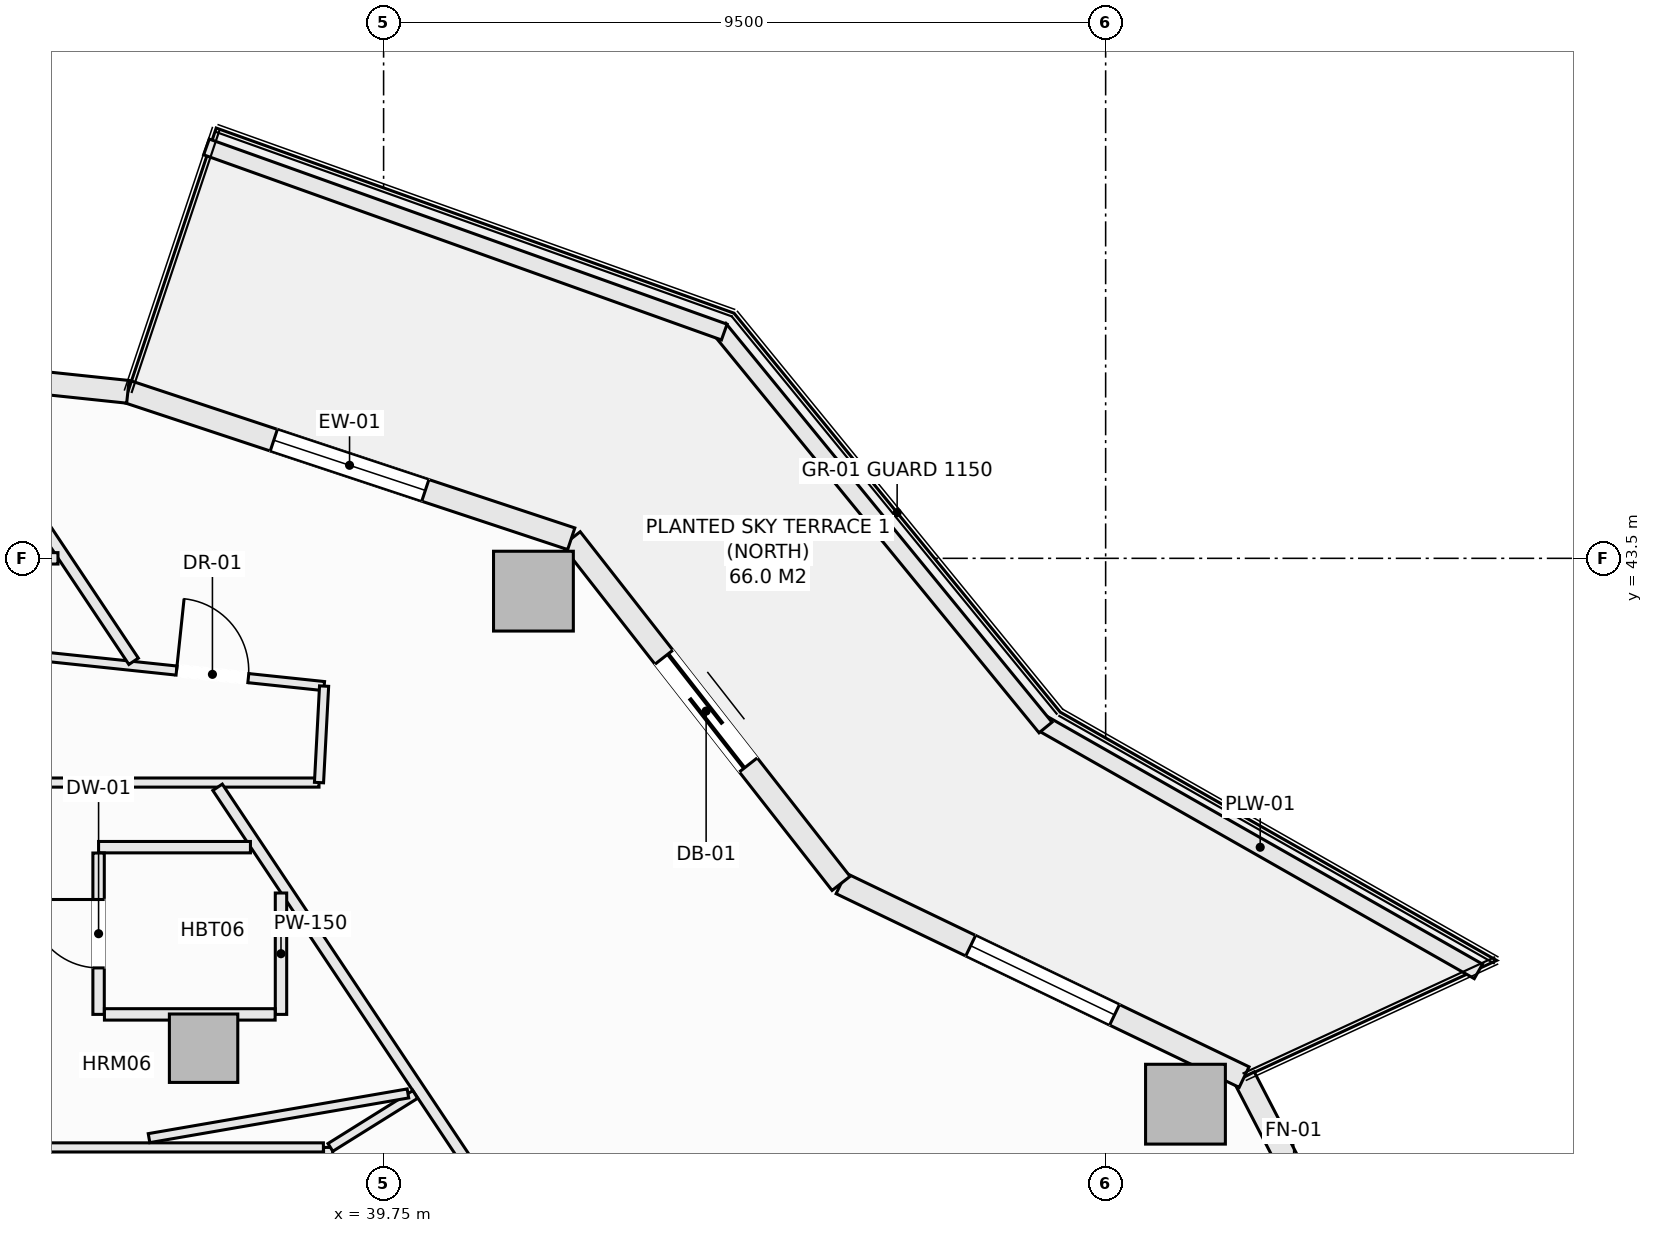
"""IFC4 building model, lengths in metres.
Left out: names, types, materials, properties, quantities, classifications, styles, units other than length and angle.
Written with IfcOpenShell. Run it as: python <this file> out.ifc"""

import sys

from ifc_helpers import new_model, si_unit, direction, frame, frame_2d, origin, origin_2d, place, context, subcontext, project, spatial, rectangle, extrude, element, fill, save


model = new_model("IFC4")
c1 = context("Model", 3, precision=1e-05, world=origin(), true_north=direction((0.0, 1.0)))
c2 = subcontext(c1, "Body", "Model", "MODEL_VIEW")
j1 = project(units=[si_unit("LENGTHUNIT", "METRE"), si_unit("PLANEANGLEUNIT", "RADIAN")], contexts=[c1])
p1 = place(None, origin())
s1 = spatial("IfcSite", under=j1, at=p1, CompositionType="ELEMENT")
p2 = place(p1, origin())
s2 = spatial("IfcBuilding", under=s1, at=p2, CompositionType="ELEMENT")
p3 = place(p2, frame((0.0, 0.0, 108.7)))
s3 = spatial("IfcBuildingStorey", under=s2, at=p3, CompositionType="ELEMENT", Elevation=108.7)
for number, where, z_axis, x_axis in (
    (1, (50.3, 36.319, -0.27), (0.0, 0.0, 1.0), (1.0, 0.0, 0.0)),
    (2, (41.721, 43.068, -0.27), (0.0, 0.0, 1.0), (1.0, 0.0, 0.0)),
):
    element("IfcColumn", number, at=place(p3, frame(where, z_axis=z_axis, x_axis=x_axis)), inside=s3, PredefinedType="COLUMN", context=c2, shape_type="SweptSolid", body=[
        extrude(rectangle(XDim=1.05, YDim=1.05, at=origin_2d()), origin(), (0.0, 0.0, 1.0), 3.4),
    ])
p4 = place(p3, frame((37.382, 37.055, -0.27), z_axis=(0.0, 0.0, 1.0), x_axis=(1.0, 0.0, 0.0)))
e3 = element("IfcColumn", 3, at=p4, inside=s3, PredefinedType="COLUMN", context=c2, shape_type="SweptSolid", body=[
    extrude(rectangle(XDim=0.9, YDim=0.9, at=origin_2d()), origin(), (0.0, 0.0, 1.0), 3.4),
])
p5 = place(p3, frame((51.072, 36.675, 0.0), z_axis=(0.0, 0.0, 1.0), x_axis=(0.459767899643, -0.888039119892, 0.0)))
e4 = element("IfcWall", 4, at=p5, inside=s3, PredefinedType="SOLIDWALL", context=c2, shape_type="SweptSolid", body=[
    extrude(rectangle(XDim=5.255, YDim=0.3, at=frame_2d((2.628, 0.0))), origin(), (0.0, 0.0, 1.0), 2.653),
])
p6 = place(p5, frame((1.578, 0.0, 0.74)))
e5 = element("IfcOpeningElement", 5, at=p6, cuts=e4, PredefinedType="OPENING", context=c2, shape_type="SweptSolid", body=[
    extrude(rectangle(XDim=2.1, YDim=1.7, at=frame_2d((1.05, 0.85))), frame((0.0, 0.16, 0.0), z_axis=(0.0, -1.0, 0.0), x_axis=(1.0, 0.0, 0.0)), (0.0, 0.0, 1.0), 0.32),
])
p7 = place(p3, frame((45.769, 39.223, 0.0), z_axis=(0.0, 0.0, 1.0), x_axis=(0.901370184739, -0.433049408339, 0.0)))
e6 = element("IfcWall", 6, at=p7, inside=s3, PredefinedType="SOLIDWALL", context=c2, shape_type="SweptSolid", body=[
    extrude(rectangle(XDim=5.884, YDim=0.3, at=frame_2d((2.942, 0.0))), origin(), (0.0, 0.0, 1.0), 2.653),
])
p8 = place(p7, frame((1.892, 0.0, 0.74)))
e7 = element("IfcOpeningElement", 7, at=p8, cuts=e6, PredefinedType="OPENING", context=c2, shape_type="SweptSolid", body=[
    extrude(rectangle(XDim=2.1, YDim=1.7, at=frame_2d((1.05, 0.85))), frame((0.0, 0.16, 0.0), z_axis=(0.0, -1.0, 0.0), x_axis=(1.0, 0.0, 0.0)), (0.0, 0.0, 1.0), 0.32),
])
p9 = place(p3, frame((42.219, 43.758, 0.0), z_axis=(0.0, 0.0, 1.0), x_axis=(0.616435134162, -0.787405693001, 0.0)))
e8 = element("IfcWall", 8, at=p9, inside=s3, PredefinedType="SOLIDWALL", context=c2, shape_type="SweptSolid", body=[
    extrude(rectangle(XDim=5.759, YDim=0.3, at=frame_2d((2.879, 0.0))), origin(), (0.0, 0.0, 1.0), 2.653),
])
p10 = place(p9, frame((1.979, 0.0, 0.0)))
e9 = element("IfcOpeningElement", 9, at=p10, cuts=e8, PredefinedType="OPENING", context=c2, shape_type="SweptSolid", body=[
    extrude(rectangle(XDim=1.8, YDim=2.25, at=frame_2d((0.9, 1.125))), frame((0.0, 0.16, 0.0), z_axis=(0.0, -1.0, 0.0), x_axis=(1.0, 0.0, 0.0)), (0.0, 0.0, 1.0), 0.32),
])
p11 = place(p3, frame((36.385, 45.691, 0.0), z_axis=(0.0, 0.0, 1.0), x_axis=(0.949238009374, -0.314558741032, 0.0)))
e10 = element("IfcWall", 10, at=p11, inside=s3, PredefinedType="SOLIDWALL", context=c2, shape_type="SweptSolid", body=[
    extrude(rectangle(XDim=6.146, YDim=0.3, at=frame_2d((3.073, 0.0))), origin(), (0.0, 0.0, 1.0), 2.653),
])
p12 = place(p11, frame((2.023, 0.0, 0.74)))
e11 = element("IfcOpeningElement", 11, at=p12, cuts=e10, PredefinedType="OPENING", context=c2, shape_type="SweptSolid", body=[
    extrude(rectangle(XDim=2.1, YDim=1.7, at=frame_2d((1.05, 0.85))), frame((0.0, 0.16, 0.0), z_axis=(0.0, -1.0, 0.0), x_axis=(1.0, 0.0, 0.0)), (0.0, 0.0, 1.0), 0.32),
])
p13 = place(p3, frame((30.125, 46.35, 0.0), z_axis=(0.0, 0.0, 1.0), x_axis=(0.994498012394, -0.104755445421, 0.0)))
e12 = element("IfcWall", 12, at=p13, inside=s3, PredefinedType="SOLIDWALL", context=c2, shape_type="SweptSolid", body=[
    extrude(rectangle(XDim=6.295, YDim=0.3, at=frame_2d((3.147, 0.0))), origin(), (0.0, 0.0, 1.0), 2.653),
])
p14 = place(p13, frame((1.18, 0.0, 0.72)))
e13 = element("IfcOpeningElement", 13, at=p14, cuts=e12, PredefinedType="OPENING", context=c2, shape_type="SweptSolid", body=[
    extrude(rectangle(XDim=1.2, YDim=1.65, at=frame_2d((0.6, 0.825))), frame((0.0, 0.16, 0.0), z_axis=(0.0, -1.0, 0.0), x_axis=(1.0, 0.0, 0.0)), (0.0, 0.0, 1.0), 0.32),
])
p15 = place(p3, frame((48.413, 41.332, 0.0), z_axis=(0.0, 0.0, 1.0), x_axis=(0.869187658335, -0.494482370361, 0.0)))
e14 = element("IfcWall", 14, at=p15, inside=s3, PredefinedType="PARAPET", context=c2, shape_type="SweptSolid", body=[
    extrude(rectangle(XDim=6.606, YDim=0.22, at=frame_2d((3.303, 0.0))), origin(), (0.0, 0.0, 1.0), 0.52),
])
p16 = place(p3, frame((44.167, 46.523, 0.0), z_axis=(0.0, 0.0, 1.0), x_axis=(0.633002467947, -0.77414977593, 0.0)))
e15 = element("IfcWall", 15, at=p16, inside=s3, PredefinedType="PARAPET", context=c2, shape_type="SweptSolid", body=[
    extrude(rectangle(XDim=6.78, YDim=0.22, at=frame_2d((3.39, 0.0))), origin(), (0.0, 0.0, 1.0), 0.52),
])
p17 = place(p3, frame((37.419, 48.913, 0.0), z_axis=(0.0, 0.0, 1.0), x_axis=(0.941632697311, -0.336642040387, 0.0)))
e16 = element("IfcWall", 16, at=p17, inside=s3, PredefinedType="PARAPET", context=c2, shape_type="SweptSolid", body=[
    extrude(rectangle(XDim=7.236, YDim=0.22, at=frame_2d((3.618, 0.0))), origin(), (0.0, 0.0, 1.0), 0.52),
])
p18 = place(p3, frame((39.02, 33.75, 0.0), z_axis=(0.0, 0.0, 1.0), x_axis=(0.0, 1.0, 0.0)))
e17 = element("IfcWall", 17, at=p18, inside=s3, PredefinedType="PARTITIONING", context=c2, shape_type="SweptSolid", body=[
    extrude(rectangle(XDim=2.0, YDim=0.12, at=frame_2d((1.0, 0.0))), origin(), (0.0, 0.0, 1.0), 3.13),
])
p19 = place(p3, frame((34.08, 35.75, 0.0), z_axis=(0.0, 0.0, 1.0), x_axis=(1.0, 0.0, 0.0)))
e18 = element("IfcWall", 18, at=p19, inside=s3, PredefinedType="PARTITIONING", context=c2, shape_type="SweptSolid", body=[
    extrude(rectangle(XDim=4.878, YDim=0.12, at=frame_2d((2.439, 0.0))), origin(), (0.0, 0.0, 1.0), 2.505),
])
p20 = place(p3, frame((34.08, 40.55, 0.0), z_axis=(0.0, 0.0, 1.0), x_axis=(1.0, 0.0, 0.0)))
e19 = element("IfcWall", 19, at=p20, inside=s3, PredefinedType="PARTITIONING", context=c2, shape_type="SweptSolid", body=[
    extrude(rectangle(XDim=4.82, YDim=0.12, at=frame_2d((2.41, 0.0))), origin(), (0.0, 0.0, 1.0), 3.13),
])
p21 = place(p3, frame((32.501, 42.5, 0.0), z_axis=(0.0, 0.0, 1.0), x_axis=(0.994501131299, -0.104725831799, 0.0)))
e20 = element("IfcWall", 20, at=p21, inside=s3, PredefinedType="PARTITIONING", context=c2, shape_type="SweptSolid", body=[
    extrude(rectangle(XDim=6.502, YDim=0.12, at=frame_2d((3.251, 0.0))), origin(), (0.0, 0.0, 1.0), 3.13),
])
p22 = place(p21, frame((4.55, 0.0, 0.0)))
e21 = element("IfcOpeningElement", 21, at=p22, cuts=e20, PredefinedType="OPENING", context=c2, shape_type="SweptSolid", body=[
    extrude(rectangle(XDim=0.95, YDim=2.1, at=frame_2d((0.475, 1.05))), frame((0.0, 0.07, 0.0), z_axis=(0.0, -1.0, 0.0), x_axis=(1.0, 0.0, 0.0)), (0.0, 0.0, 1.0), 0.14),
])
p23 = place(p3, frame((38.9, 40.55, 0.0), z_axis=(0.0, 0.0, 1.0), x_axis=(0.052831079727, 0.99860346335, 0.0)))
e22 = element("IfcWall", 22, at=p23, inside=s3, PredefinedType="PARTITIONING", context=c2, shape_type="SweptSolid", body=[
    extrude(rectangle(XDim=1.271, YDim=0.12, at=frame_2d((0.635, 0.0))), origin(), (0.0, 0.0, 1.0), 3.13),
])
p24 = place(p3, frame((34.035, 45.785, 0.0), z_axis=(0.0, 0.0, 1.0), x_axis=(0.554584277701, -0.832127561691, 0.0)))
e23 = element("IfcWall", 23, at=p24, inside=s3, PredefinedType="PARTITIONING", context=c2, shape_type="SweptSolid", body=[
    extrude(rectangle(XDim=4.375, YDim=0.15, at=frame_2d((2.187, 0.0))), origin(), (0.0, 0.0, 1.0), 3.13),
])
p25 = place(p3, frame((37.565, 40.488, 0.0), z_axis=(0.0, 0.0, 1.0), x_axis=(0.554585457046, -0.832126775698, 0.0)))
e24 = element("IfcWall", 24, at=p25, inside=s3, PredefinedType="PARTITIONING", context=c2, shape_type="SweptSolid", body=[
    extrude(rectangle(XDim=19.151, YDim=0.15, at=frame_2d((9.575, 0.0))), origin(), (0.0, 0.0, 1.0), 3.13),
])
p26 = place(p3, frame((38.4, 37.5, 0.0), z_axis=(0.0, 0.0, 1.0), x_axis=(0.0, 1.0, 0.0)))
e25 = element("IfcWall", 25, at=p26, inside=s3, PredefinedType="PARTITIONING", context=c2, shape_type="SweptSolid", body=[
    extrude(rectangle(XDim=1.597, YDim=0.15, at=frame_2d((0.798, 0.0))), origin(), (0.0, 0.0, 1.0), 2.505),
])
p27 = place(p3, frame((39.05, 35.75, 0.0), z_axis=(0.0, 0.0, 1.0), x_axis=(0.848206690128, 0.529665376272, 0.0)))
e26 = element("IfcWall", 26, at=p27, inside=s3, PredefinedType="PARTITIONING", context=c2, shape_type="SweptSolid", body=[
    extrude(rectangle(XDim=1.316, YDim=0.12, at=frame_2d((0.658, 0.0))), origin(), (0.0, 0.0, 1.0), 3.13),
])
p28 = place(p3, frame((36.0, 39.7, 0.0), z_axis=(0.0, 0.0, 1.0), x_axis=(1.0, 0.0, 0.0)))
e27 = element("IfcWall", 27, at=p28, inside=s3, PredefinedType="PARTITIONING", context=c2, shape_type="SweptSolid", body=[
    extrude(rectangle(XDim=1.998, YDim=0.15, at=frame_2d((0.999, 0.0))), origin(), (0.0, 0.0, 1.0), 3.13),
])
p29 = place(p3, frame((36.0, 37.5, 0.0), z_axis=(0.0, 0.0, 1.0), x_axis=(0.0, 1.0, 0.0)))
e28 = element("IfcWall", 28, at=p29, inside=s3, PredefinedType="PARTITIONING", context=c2, shape_type="SweptSolid", body=[
    extrude(rectangle(XDim=2.123, YDim=0.15, at=frame_2d((1.062, 0.0))), origin(), (0.0, 0.0, 1.0), 3.13),
])
p30 = place(p29, frame((0.612, 0.0, 0.0)))
e29 = element("IfcOpeningElement", 29, at=p30, cuts=e28, PredefinedType="OPENING", context=c2, shape_type="SweptSolid", body=[
    extrude(rectangle(XDim=0.9, YDim=2.1, at=frame_2d((0.45, 1.05))), frame((0.0, 0.085, 0.0), z_axis=(0.0, -1.0, 0.0), x_axis=(1.0, 0.0, 0.0)), (0.0, 0.0, 1.0), 0.17),
])
p31 = place(p3, frame((36.077, 37.5, 0.0), z_axis=(0.0, 0.0, 1.0), x_axis=(1.0, 0.0, 0.0)))
e30 = element("IfcWall", 30, at=p31, inside=s3, PredefinedType="PARTITIONING", context=c2, shape_type="SweptSolid", body=[
    extrude(rectangle(XDim=2.246, YDim=0.15, at=frame_2d((1.123, 0.0))), origin(), (0.0, 0.0, 1.0), 2.505),
])
p32 = place(p3, frame((36.664, 35.872, 0.0), z_axis=(0.0, 0.0, 1.0), x_axis=(0.985420944478, 0.170133953648, 0.0)))
e31 = element("IfcWall", 31, at=p32, inside=s3, PredefinedType="PARTITIONING", context=c2, shape_type="SweptSolid", body=[
    extrude(rectangle(XDim=3.457, YDim=0.12, at=frame_2d((1.729, 0.0))), origin(), (0.0, 0.0, 1.0), 3.13),
])
p33 = place(p3, frame((33.077, 43.5, 0.0), z_axis=(0.0, 0.0, 1.0), x_axis=(1.0, 0.0, 0.0)))
e32 = element("IfcWall", 32, at=p33, inside=s3, PredefinedType="PARTITIONING", context=c2, shape_type="SweptSolid", body=[
    extrude(rectangle(XDim=2.389, YDim=0.15, at=frame_2d((1.194, 0.0))), origin(), (0.0, 0.0, 1.0), 3.13),
])
p34 = place(p8, origin())
e33 = element("IfcWindow", 33, at=p34, inside=s3, PartitioningType="SINGLE_PANEL", PredefinedType="WINDOW", context=c2, shape_type="SweptSolid", body=[
    extrude(rectangle(XDim=2.1, YDim=1.7, at=frame_2d((1.05, 0.85))), frame((0.0, 0.03, 0.0), z_axis=(0.0, -1.0, 0.0), x_axis=(1.0, 0.0, 0.0)), (0.0, 0.0, 1.0), 0.06),
])
fill(e7, e33)
p35 = place(p10, origin())
e34 = element("IfcDoor", 34, at=p35, inside=s3, OperationType="SLIDING_TO_LEFT", PredefinedType="DOOR", context=c2, shape_type="SweptSolid", body=[
    extrude(rectangle(XDim=1.8, YDim=2.25, at=frame_2d((0.9, 1.125))), frame((0.0, 0.025, 0.0), z_axis=(0.0, -1.0, 0.0), x_axis=(1.0, 0.0, 0.0)), (0.0, 0.0, 1.0), 0.05),
])
fill(e9, e34)
p36 = place(p12, origin())
e35 = element("IfcWindow", 35, at=p36, inside=s3, PartitioningType="SINGLE_PANEL", PredefinedType="WINDOW", context=c2, shape_type="SweptSolid", body=[
    extrude(rectangle(XDim=2.1, YDim=1.7, at=frame_2d((1.05, 0.85))), frame((0.0, 0.03, 0.0), z_axis=(0.0, -1.0, 0.0), x_axis=(1.0, 0.0, 0.0)), (0.0, 0.0, 1.0), 0.06),
])
fill(e11, e35)
p37 = place(p22, origin())
e36 = element("IfcDoor", 36, at=p37, inside=s3, OperationType="SINGLE_SWING_LEFT", PredefinedType="DOOR", context=c2, shape_type="SweptSolid", body=[
    extrude(rectangle(XDim=0.95, YDim=2.1, at=frame_2d((0.475, 1.05))), frame((0.0, 0.025, 0.0), z_axis=(0.0, -1.0, 0.0), x_axis=(1.0, 0.0, 0.0)), (0.0, 0.0, 1.0), 0.05),
])
fill(e21, e36)
p38 = place(p30, origin())
e37 = element("IfcDoor", 37, at=p38, inside=s3, OperationType="SINGLE_SWING_RIGHT", PredefinedType="DOOR", context=c2, shape_type="SweptSolid", body=[
    extrude(rectangle(XDim=0.9, YDim=2.1, at=frame_2d((0.45, 1.05))), frame((0.0, 0.025, 0.0), z_axis=(0.0, -1.0, 0.0), x_axis=(1.0, 0.0, 0.0)), (0.0, 0.0, 1.0), 0.05),
])
fill(e29, e37)
save(model, sys.argv[1])
